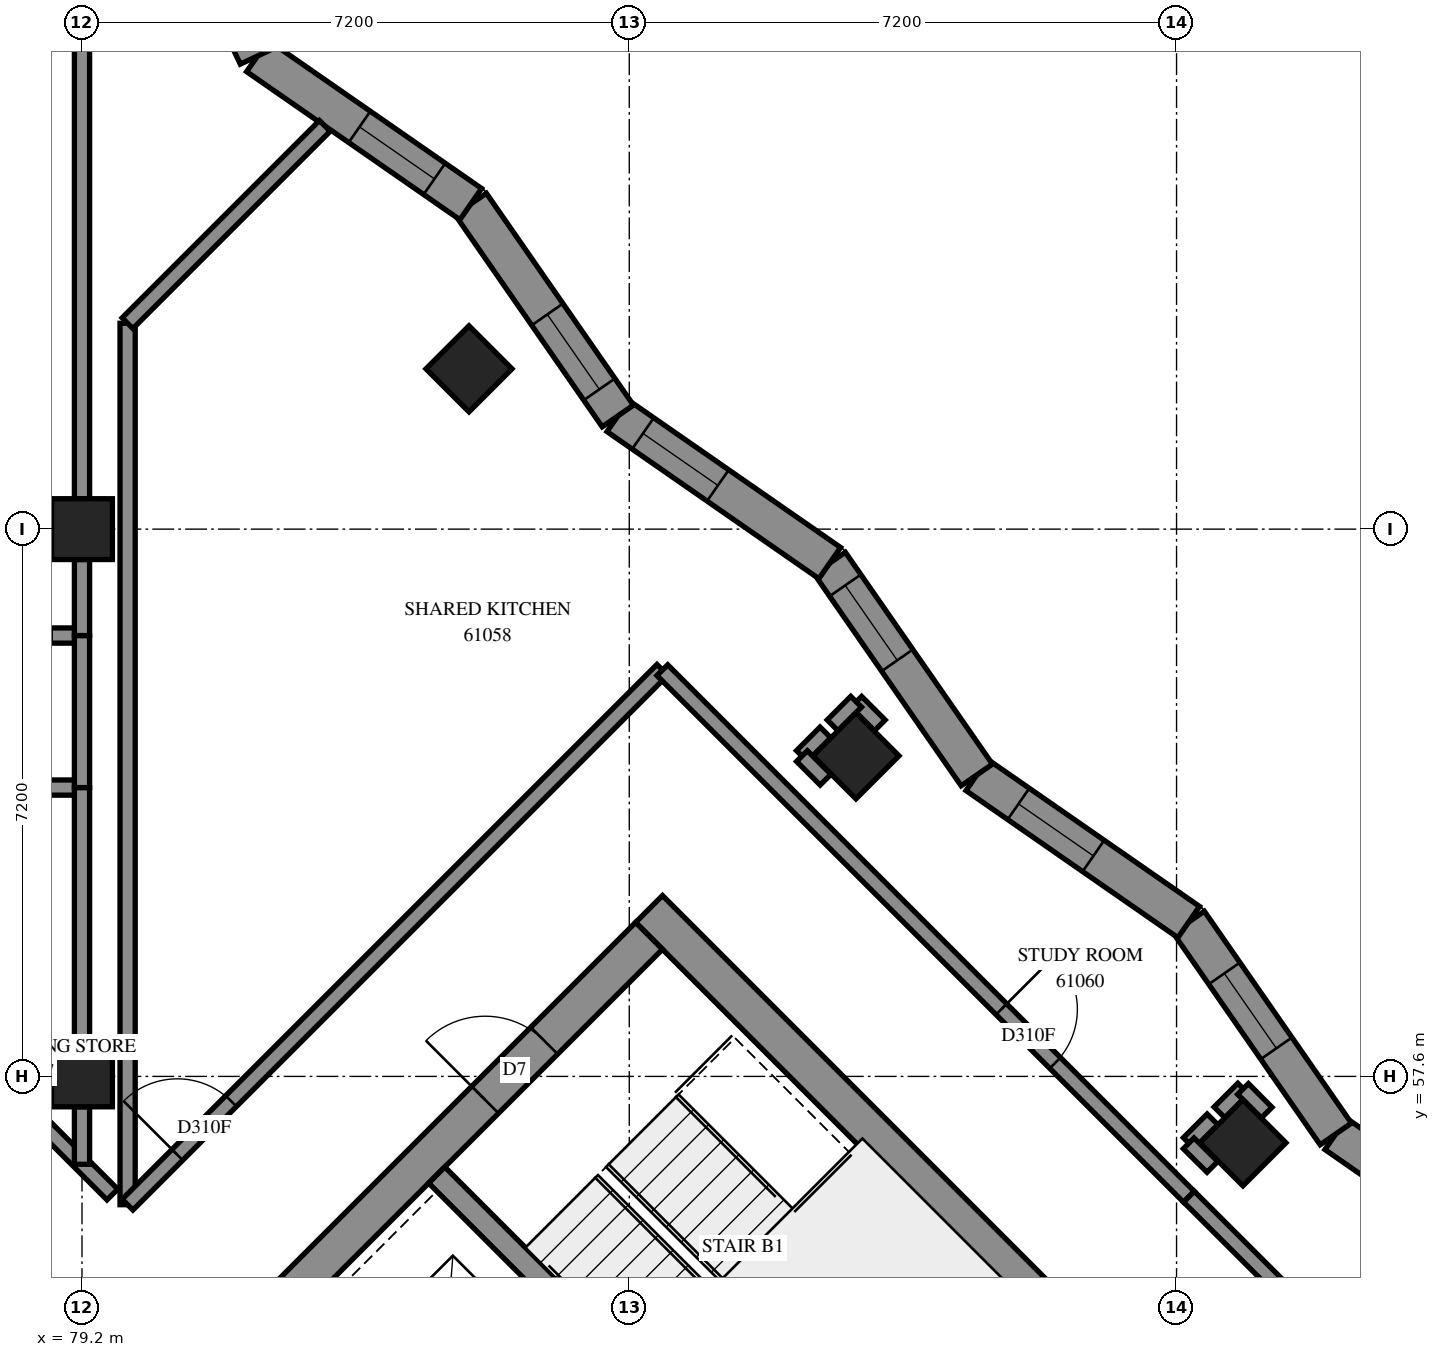
"""IFC4 building model, lengths in metres.
Left out: names, types, materials, properties, quantities, classifications, styles, units other than length and angle.
Written with IfcOpenShell. Run it as: python <this file> out.ifc"""

import sys

from ifc_helpers import new_model, si_unit, direction, frame, frame_2d, origin, origin_2d, place, context, subcontext, project, spatial, polyline, rectangle, outline, extrude, element, fill, save


model = new_model("IFC4")
c1 = context("Model", 3, precision=1e-05, world=origin(), true_north=direction((0.0, 1.0)))
c2 = subcontext(c1, "Body", "Model", "MODEL_VIEW")
j1 = project(units=[si_unit("LENGTHUNIT", "METRE"), si_unit("PLANEANGLEUNIT", "RADIAN")], contexts=[c1])
p1 = place(None, origin())
s1 = spatial("IfcSite", under=j1, at=p1, CompositionType="ELEMENT")
p2 = place(p1, origin())
s2 = spatial("IfcBuilding", under=s1, at=p2, CompositionType="ELEMENT")
p3 = place(p2, frame((0.0, 0.0, 223.6)))
s3 = spatial("IfcBuildingStorey", under=s2, at=p3, CompositionType="ELEMENT", Elevation=223.6)
for number, where, z_axis, x_axis in (
    (1, (79.2, 57.6, 0.0), (0.0, 0.0, 1.0), (1.0, 0.0, 0.0)),
    (2, (79.2, 64.8, 0.0), (0.0, 0.0, 1.0), (1.0, 0.0, 0.0)),
    (3, (84.291, 66.909, 0.0), (0.0, 0.0, 1.0), (0.707, -0.707, 0.0)),
    (4, (89.382, 61.818, 0.0), (0.0, 0.0, 1.0), (0.707, -0.707, 0.0)),
    (5, (94.474, 56.727, 0.0), (0.0, 0.0, 1.0), (0.707, -0.707, 0.0)),
):
    element("IfcColumn", number, at=place(p3, frame(where, z_axis=z_axis, x_axis=x_axis)), inside=s3, PredefinedType="COLUMN", context=c2, shape_type="SweptSolid", body=[
        extrude(rectangle(XDim=0.8, YDim=0.8, at=origin_2d()), origin(), (0.0, 0.0, 1.0), 3.1),
    ])
p4 = place(p3, frame((86.66, 59.802, -0.3), z_axis=(0.0, 0.0, 1.0), x_axis=(0.7071067812, -0.7071067812, 0.0)))
e6 = element("IfcWall", 6, at=p4, inside=s3, PredefinedType="SHEAR", context=c2, shape_type="SweptSolid", body=[
    extrude(rectangle(XDim=15.4, YDim=0.5, at=frame_2d((7.7, 0.0))), origin(), (0.0, 0.0, 1.0), 2.7),
])
p5 = place(p4, frame((10.5, 0.0, 0.3)))
e7 = element("IfcOpeningElement", 7, at=p5, cuts=e6, PredefinedType="OPENING", context=c2, shape_type="SweptSolid", body=[
    extrude(rectangle(XDim=0.8, YDim=2.1, at=frame_2d((0.4, 1.05))), frame((0.0, 0.26, 0.0), z_axis=(0.0, -1.0, 0.0), x_axis=(1.0, 0.0, 0.0)), (0.0, 0.0, 1.0), 0.52),
])
p6 = place(p3, frame((76.478, 49.267, -0.3), z_axis=(0.0, 0.0, 1.0), x_axis=(0.7071067812, 0.7071067812, 0.0)))
e8 = element("IfcWall", 8, at=p6, inside=s3, PredefinedType="SHEAR", context=c2, shape_type="SweptSolid", body=[
    extrude(rectangle(XDim=14.4, YDim=0.5, at=frame_2d((7.2, 0.0))), origin(), (0.0, 0.0, 1.0), 2.7),
])
p7 = place(p6, frame((4.55, 0.0, 0.3)))
e9 = element("IfcOpeningElement", 9, at=p7, cuts=e8, PredefinedType="OPENING", context=c2, shape_type="SweptSolid", body=[
    extrude(rectangle(XDim=1.1, YDim=2.1, at=frame_2d((0.55, 1.05))), frame((0.0, 0.26, 0.0), z_axis=(0.0, -1.0, 0.0), x_axis=(1.0, 0.0, 0.0)), (0.0, 0.0, 1.0), 0.52),
])
p8 = place(p6, frame((11.35, 0.0, 0.3)))
e10 = element("IfcOpeningElement", 10, at=p8, cuts=e8, PredefinedType="OPENING", context=c2, shape_type="SweptSolid", body=[
    extrude(rectangle(XDim=1.1, YDim=2.1, at=frame_2d((0.55, 1.05))), frame((0.0, 0.26, 0.0), z_axis=(0.0, -1.0, 0.0), x_axis=(1.0, 0.0, 0.0)), (0.0, 0.0, 1.0), 0.52),
])
p9 = place(p3, frame((83.867, 56.302, 0.0), z_axis=(0.0, 0.0, 1.0), x_axis=(0.7071137256, -0.7070998367, 0.0)))
e11 = element("IfcWall", 11, at=p9, inside=s3, PredefinedType="SOLIDWALL", context=c2, shape_type="SweptSolid", body=[
    extrude(rectangle(XDim=7.2, YDim=0.3, at=frame_2d((3.6, 0.0))), origin(), (0.0, 0.0, 1.0), 3.1),
])
p10 = place(p3, frame((98.483, 54.908, 0.0), z_axis=(0.0, 0.0, 1.0), x_axis=(-0.8215041665, 0.5702025117, 0.0)))
e12 = element("IfcWall", 12, at=p10, inside=s3, PredefinedType="SOLIDWALL", context=c2, shape_type="SweptSolid", body=[
    extrude(outline(polyline([(-0.045, -0.25), (3.348, -0.25), (3.439, 0.25), (0.045, 0.25), (-0.045, -0.25)])), origin(), (0.0, 0.0, 1.0), 3.1),
])
p11 = place(p10, frame((1.261, 0.0, 0.45)))
e13 = element("IfcOpeningElement", 13, at=p11, cuts=e12, PredefinedType="OPENING", context=c2, shape_type="SweptSolid", body=[
    extrude(rectangle(XDim=1.2, YDim=2.5, at=frame_2d((0.6, 1.25))), frame((0.0, 0.26, 0.0), z_axis=(0.0, -1.0, 0.0), x_axis=(1.0, 0.0, 0.0)), (0.0, 0.0, 1.0), 0.52),
])
p12 = place(p3, frame((95.695, 56.843, 0.0), z_axis=(0.0, 0.0, 1.0), x_axis=(-0.5702025117, 0.8215041665, 0.0)))
e14 = element("IfcWall", 14, at=p12, inside=s3, PredefinedType="SOLIDWALL", context=c2, shape_type="SweptSolid", body=[
    extrude(outline(polyline([(0.045, -0.25), (3.439, -0.25), (3.348, 0.25), (-0.045, 0.25), (0.045, -0.25)])), origin(), (0.0, 0.0, 1.0), 3.1),
])
p13 = place(p12, frame((1.371, 0.0, 0.45)))
e15 = element("IfcOpeningElement", 15, at=p13, cuts=e14, PredefinedType="OPENING", context=c2, shape_type="SweptSolid", body=[
    extrude(rectangle(XDim=1.2, YDim=2.5, at=frame_2d((0.6, 1.25))), frame((0.0, 0.26, 0.0), z_axis=(0.0, -1.0, 0.0), x_axis=(1.0, 0.0, 0.0)), (0.0, 0.0, 1.0), 0.52),
])
p14 = place(p3, frame((93.76, 59.631, 0.0), z_axis=(0.0, 0.0, 1.0), x_axis=(-0.8215041665, 0.5702025117, 0.0)))
e16 = element("IfcWall", 16, at=p14, inside=s3, PredefinedType="SOLIDWALL", context=c2, shape_type="SweptSolid", body=[
    extrude(outline(polyline([(-0.045, -0.25), (3.348, -0.25), (3.439, 0.25), (0.045, 0.25), (-0.045, -0.25)])), origin(), (0.0, 0.0, 1.0), 3.1),
])
p15 = place(p14, frame((1.526, 0.0, 0.45)))
e17 = element("IfcOpeningElement", 17, at=p15, cuts=e16, PredefinedType="OPENING", context=c2, shape_type="SweptSolid", body=[
    extrude(rectangle(XDim=1.2, YDim=2.5, at=frame_2d((0.6, 1.25))), frame((0.0, 0.26, 0.0), z_axis=(0.0, -1.0, 0.0), x_axis=(1.0, 0.0, 0.0)), (0.0, 0.0, 1.0), 0.52),
])
p16 = place(p3, frame((90.972, 61.566, 0.0), z_axis=(0.0, 0.0, 1.0), x_axis=(-0.5702025117, 0.8215041665, 0.0)))
e18 = element("IfcWall", 18, at=p16, inside=s3, PredefinedType="SOLIDWALL", context=c2, shape_type="SweptSolid", body=[
    extrude(outline(polyline([(0.045, -0.25), (3.439, -0.25), (3.348, 0.25), (-0.045, 0.25), (0.045, -0.25)])), origin(), (0.0, 0.0, 1.0), 3.1),
])
p17 = place(p16, frame((1.836, 0.0, 0.45)))
e19 = element("IfcOpeningElement", 19, at=p17, cuts=e18, PredefinedType="OPENING", context=c2, shape_type="SweptSolid", body=[
    extrude(rectangle(XDim=1.2, YDim=2.5, at=frame_2d((0.6, 1.25))), frame((0.0, 0.26, 0.0), z_axis=(0.0, -1.0, 0.0), x_axis=(1.0, 0.0, 0.0)), (0.0, 0.0, 1.0), 0.52),
])
p18 = place(p3, frame((89.037, 64.353, 0.0), z_axis=(0.0, 0.0, 1.0), x_axis=(-0.8215041665, 0.5702025117, 0.0)))
e20 = element("IfcWall", 20, at=p18, inside=s3, PredefinedType="SOLIDWALL", context=c2, shape_type="SweptSolid", body=[
    extrude(outline(polyline([(-0.045, -0.25), (3.348, -0.25), (3.439, 0.25), (0.045, 0.25), (-0.045, -0.25)])), origin(), (0.0, 0.0, 1.0), 3.1),
])
p19 = place(p18, frame((1.791, 0.0, 0.45)))
e21 = element("IfcOpeningElement", 21, at=p19, cuts=e20, PredefinedType="OPENING", context=c2, shape_type="SweptSolid", body=[
    extrude(rectangle(XDim=1.2, YDim=2.5, at=frame_2d((0.6, 1.25))), frame((0.0, 0.26, 0.0), z_axis=(0.0, -1.0, 0.0), x_axis=(1.0, 0.0, 0.0)), (0.0, 0.0, 1.0), 0.52),
])
p20 = place(p3, frame((86.249, 66.288, 0.0), z_axis=(0.0, 0.0, 1.0), x_axis=(-0.5702025117, 0.8215041665, 0.0)))
e22 = element("IfcWall", 22, at=p20, inside=s3, PredefinedType="SOLIDWALL", context=c2, shape_type="SweptSolid", body=[
    extrude(outline(polyline([(0.045, -0.25), (3.439, -0.25), (3.348, 0.25), (-0.045, 0.25), (0.045, -0.25)])), origin(), (0.0, 0.0, 1.0), 3.1),
])
p21 = place(p20, frame((0.426, 0.0, 0.45)))
e23 = element("IfcOpeningElement", 23, at=p21, cuts=e22, PredefinedType="OPENING", context=c2, shape_type="SweptSolid", body=[
    extrude(rectangle(XDim=1.2, YDim=2.5, at=frame_2d((0.6, 1.25))), frame((0.0, 0.26, 0.0), z_axis=(0.0, -1.0, 0.0), x_axis=(1.0, 0.0, 0.0)), (0.0, 0.0, 1.0), 0.52),
])
p22 = place(p3, frame((84.314, 69.076, 0.0), z_axis=(0.0, 0.0, 1.0), x_axis=(-0.8215033056, 0.5702037521, 0.0)))
e24 = element("IfcWall", 24, at=p22, inside=s3, PredefinedType="SOLIDWALL", context=c2, shape_type="SweptSolid", body=[
    extrude(outline(polyline([(-0.045, -0.25), (3.348, -0.25), (3.483, 0.25), (0.045, 0.25), (-0.045, -0.25)])), origin(), (0.0, 0.0, 1.0), 3.1),
])
p23 = place(p22, frame((0.581, 0.0, 0.45)))
e25 = element("IfcOpeningElement", 25, at=p23, cuts=e24, PredefinedType="OPENING", context=c2, shape_type="SweptSolid", body=[
    extrude(rectangle(XDim=1.2, YDim=2.5, at=frame_2d((0.6, 1.25))), frame((0.0, 0.26, 0.0), z_axis=(0.0, -1.0, 0.0), x_axis=(1.0, 0.0, 0.0)), (0.0, 0.0, 1.0), 0.52),
])
p24 = place(p3, frame((81.508, 71.024, 0.0), z_axis=(0.0, 0.0, 1.0), x_axis=(-0.4256057347, 0.9049087018, 0.0)))
e26 = element("IfcWall", 26, at=p24, inside=s3, PredefinedType="SOLIDWALL", context=c2, shape_type="SweptSolid", body=[
    extrude(outline(polyline([(0.067, -0.25), (3.617, -0.25), (3.181, 0.25), (-0.067, 0.25), (0.067, -0.25)])), origin(), (0.0, 0.0, 1.0), 3.1),
])
p25 = place(p24, frame((0.734, 0.0, 0.45)))
e27 = element("IfcOpeningElement", 27, at=p25, cuts=e26, PredefinedType="OPENING", context=c2, shape_type="SweptSolid", body=[
    extrude(rectangle(XDim=1.2, YDim=2.5, at=frame_2d((0.6, 1.25))), frame((0.0, 0.26, 0.0), z_axis=(0.0, -1.0, 0.0), x_axis=(1.0, 0.0, 0.0)), (0.0, 0.0, 1.0), 0.52),
])
p26 = place(p3, frame((79.8, 55.912, 0.0), z_axis=(0.0, 0.0, 1.0), x_axis=(0.0, 1.0, 0.0)))
e28 = element("IfcWall", 28, at=p26, inside=s3, PredefinedType="PARTITIONING", context=c2, shape_type="SweptSolid", body=[
    extrude(rectangle(XDim=11.596, YDim=0.2, at=frame_2d((5.798, 0.0))), origin(), (0.0, 0.0, 1.0), 3.1),
])
p27 = place(p3, frame((79.799, 55.913, 0.0), z_axis=(0.0, 0.0, 1.0), x_axis=(0.7071067812, 0.7071067812, 0.0)))
e29 = element("IfcWall", 29, at=p27, inside=s3, PredefinedType="PARTITIONING", context=c2, shape_type="SweptSolid", body=[
    extrude(rectangle(XDim=9.95, YDim=0.2, at=frame_2d((4.975, 0.0))), origin(), (0.0, 0.0, 1.0), 3.1),
])
p28 = place(p27, frame((0.927, 0.0, 0.0)))
e30 = element("IfcOpeningElement", 30, at=p28, cuts=e29, PredefinedType="OPENING", context=c2, shape_type="SweptSolid", body=[
    extrude(rectangle(XDim=1.0, YDim=2.1, at=frame_2d((0.5, 1.05))), frame((0.0, 0.11, 0.0), z_axis=(0.0, -1.0, 0.0), x_axis=(1.0, 0.0, 0.0)), (0.0, 0.0, 1.0), 0.22),
])
p29 = place(p3, frame((86.835, 62.945, 0.0), z_axis=(0.0, 0.0, 1.0), x_axis=(0.7071067812, -0.7071067812, 0.0)))
e31 = element("IfcWall", 31, at=p29, inside=s3, PredefinedType="PARTITIONING", context=c2, shape_type="SweptSolid", body=[
    extrude(rectangle(XDim=9.798, YDim=0.2, at=frame_2d((4.899, 0.0))), origin(), (0.0, 0.0, 1.0), 3.1),
])
p30 = place(p29, frame((6.308, 0.0, 0.0)))
e32 = element("IfcOpeningElement", 32, at=p30, cuts=e31, PredefinedType="OPENING", context=c2, shape_type="SweptSolid", body=[
    extrude(rectangle(XDim=1.0, YDim=2.1, at=frame_2d((0.5, 1.05))), frame((0.0, 0.11, 0.0), z_axis=(0.0, -1.0, 0.0), x_axis=(1.0, 0.0, 0.0)), (0.0, 0.0, 1.0), 0.22),
])
p31 = place(p3, frame((79.2, 65.2, 0.0), z_axis=(0.0, 0.0, 1.0), x_axis=(0.0, 1.0, 0.0)))
e33 = element("IfcWall", 33, at=p31, inside=s3, PredefinedType="PARTITIONING", context=c2, shape_type="SweptSolid", body=[
    extrude(rectangle(XDim=6.4, YDim=0.2, at=frame_2d((3.2, 0.0))), origin(), (0.0, 0.0, 1.0), 3.1),
])
p32 = place(p3, frame((74.246, 61.4, 0.0), z_axis=(0.0, 0.0, 1.0), x_axis=(1.0, 0.0, 0.0)))
e34 = element("IfcWall", 34, at=p32, inside=s3, PredefinedType="PARTITIONING", context=c2, shape_type="SweptSolid", body=[
    extrude(rectangle(XDim=4.954, YDim=0.2, at=frame_2d((2.477, 0.0))), origin(), (0.0, 0.0, 1.0), 3.1),
])
p33 = place(p32, frame((1.17, 0.0, 0.0)))
e35 = element("IfcOpeningElement", 35, at=p33, cuts=e34, PredefinedType="OPENING", context=c2, shape_type="SweptSolid", body=[
    extrude(rectangle(XDim=1.0, YDim=2.1, at=frame_2d((0.5, 1.05))), frame((0.0, 0.11, 0.0), z_axis=(0.0, -1.0, 0.0), x_axis=(1.0, 0.0, 0.0)), (0.0, 0.0, 1.0), 0.22),
])
p34 = place(p3, frame((74.602, 63.4, 0.0), z_axis=(0.0, 0.0, 1.0), x_axis=(1.0, 0.0, 0.0)))
e36 = element("IfcWall", 36, at=p34, inside=s3, PredefinedType="PARTITIONING", context=c2, shape_type="SweptSolid", body=[
    extrude(rectangle(XDim=4.598, YDim=0.2, at=frame_2d((2.299, 0.0))), origin(), (0.0, 0.0, 1.0), 3.1),
])
p35 = place(p34, frame((3.298, 0.0, 0.0)))
e37 = element("IfcOpeningElement", 37, at=p35, cuts=e36, PredefinedType="OPENING", context=c2, shape_type="SweptSolid", body=[
    extrude(rectangle(XDim=0.9, YDim=2.1, at=frame_2d((0.45, 1.05))), frame((0.0, 0.11, 0.0), z_axis=(0.0, -1.0, 0.0), x_axis=(1.0, 0.0, 0.0)), (0.0, 0.0, 1.0), 0.22),
])
p36 = place(p3, frame((76.513, 59.131, 0.0), z_axis=(0.0, 0.0, 1.0), x_axis=(0.7073587997, -0.7068546728, 0.0)))
e38 = element("IfcWall", 38, at=p36, inside=s3, PredefinedType="PARTITIONING", context=c2, shape_type="SweptSolid", body=[
    extrude(rectangle(XDim=4.364, YDim=0.2, at=frame_2d((2.182, 0.0))), origin(), (0.0, 0.0, 1.0), 3.1),
])
p37 = place(p3, frame((79.799, 67.509, 0.0), z_axis=(0.0, 0.0, 1.0), x_axis=(0.707093159, 0.7071204031, 0.0)))
e39 = element("IfcWall", 39, at=p37, inside=s3, PredefinedType="PARTITIONING", context=c2, shape_type="SweptSolid", body=[
    extrude(rectangle(XDim=3.671, YDim=0.2, at=frame_2d((1.835, 0.0))), origin(), (0.0, 0.0, 1.0), 3.1),
])
p38 = place(p3, frame((79.2, 58.0, 0.0), z_axis=(0.0, 0.0, 1.0), x_axis=(0.0, 1.0, 0.0)))
e40 = element("IfcWall", 40, at=p38, inside=s3, PredefinedType="PARTITIONING", context=c2, shape_type="SweptSolid", body=[
    extrude(rectangle(XDim=3.4, YDim=0.2, at=frame_2d((1.7, 0.0))), origin(), (0.0, 0.0, 1.0), 3.1),
])
p39 = place(p3, frame((79.2, 61.4, 0.0), z_axis=(0.0, 0.0, 1.0), x_axis=(0.0, 1.0, 0.0)))
e41 = element("IfcWall", 41, at=p39, inside=s3, PredefinedType="PARTITIONING", context=c2, shape_type="SweptSolid", body=[
    extrude(rectangle(XDim=2.0, YDim=0.2, at=frame_2d((1.0, 0.0))), origin(), (0.0, 0.0, 1.0), 3.1),
])
p40 = place(p3, frame((93.763, 56.017, 0.0), z_axis=(0.0, 0.0, 1.0), x_axis=(0.7076620277, -0.7065510983, 0.0)))
e42 = element("IfcWall", 42, at=p40, inside=s3, PredefinedType="PARTITIONING", context=c2, shape_type="SweptSolid", body=[
    extrude(rectangle(XDim=1.8, YDim=0.2, at=frame_2d((0.9, 0.0))), origin(), (0.0, 0.0, 1.0), 3.1),
])
p41 = place(p3, frame((79.2, 63.4, 0.0), z_axis=(0.0, 0.0, 1.0), x_axis=(0.0, 1.0, 0.0)))
e43 = element("IfcWall", 43, at=p41, inside=s3, PredefinedType="PARTITIONING", context=c2, shape_type="SweptSolid", body=[
    extrude(rectangle(XDim=1.0, YDim=0.2, at=frame_2d((0.5, 0.0))), origin(), (0.0, 0.0, 1.0), 3.1),
])
p42 = place(p3, frame((79.2, 56.444, 0.0), z_axis=(0.0, 0.0, 1.0), x_axis=(0.0, 1.0, 0.0)))
e44 = element("IfcWall", 44, at=p42, inside=s3, PredefinedType="PARTITIONING", context=c2, shape_type="SweptSolid", body=[
    extrude(rectangle(XDim=0.756, YDim=0.2, at=frame_2d((0.378, 0.0))), origin(), (0.0, 0.0, 1.0), 3.1),
])
for number, where, z_axis, x_axis in (
    (45, (93.761, 56.723, 0.0), (0.0, 0.0, 1.0), (0.707, 0.707, 0.0)),
    (46, (94.165, 57.127, 0.0), (0.0, 0.0, 1.0), (0.707, 0.707, 0.0)),
):
    element("IfcWall", number, at=place(p3, frame(where, z_axis=z_axis, x_axis=x_axis)), inside=s3, PredefinedType="PARTITIONING", context=c2, shape_type="SweptSolid", body=[
        extrude(rectangle(XDim=0.441, YDim=0.2, at=frame_2d((0.221, 0.0))), origin(), (0.0, 0.0, 1.0), 3.1),
    ])
for number, where, z_axis, x_axis in (
    (47, (94.475, 57.435, 0.0), (0.0, 0.0, 1.0), (0.705, -0.709, 0.0)),
    (48, (93.76, 56.719, 0.0), (0.0, 0.0, 1.0), (0.709, -0.705, 0.0)),
):
    element("IfcWall", number, at=place(p3, frame(where, z_axis=z_axis, x_axis=x_axis)), inside=s3, PredefinedType="PARTITIONING", context=c2, shape_type="SweptSolid", body=[
        extrude(rectangle(XDim=0.44, YDim=0.2, at=frame_2d((0.22, 0.0))), origin(), (0.0, 0.0, 1.0), 3.1),
    ])
for number, where, z_axis, x_axis in (
    (49, (88.671, 61.815, 0.0), (0.0, 0.0, 1.0), (0.707, 0.707, 0.0)),
    (50, (88.672, 61.814, 0.0), (0.0, 0.0, 1.0), (0.707, -0.707, 0.0)),
    (51, (89.386, 62.528, 0.0), (0.0, 0.0, 1.0), (0.707, -0.707, 0.0)),
    (52, (89.075, 62.219, 0.0), (0.0, 0.0, 1.0), (0.707, 0.707, 0.0)),
):
    element("IfcWall", number, at=place(p3, frame(where, z_axis=z_axis, x_axis=x_axis)), inside=s3, PredefinedType="PARTITIONING", context=c2, shape_type="SweptSolid", body=[
        extrude(rectangle(XDim=0.438, YDim=0.2, at=frame_2d((0.219, 0.0))), origin(), (0.0, 0.0, 1.0), 3.1),
    ])
p43 = place(p13, origin())
e53 = element("IfcWindow", 53, at=p43, inside=s3, PartitioningType="SINGLE_PANEL", PredefinedType="WINDOW", context=c2, shape_type="SweptSolid", body=[
    extrude(rectangle(XDim=1.2, YDim=2.5, at=frame_2d((0.6, 1.25))), frame((0.0, 0.18, 0.0), z_axis=(0.0, -1.0, 0.0), x_axis=(1.0, 0.0, 0.0)), (0.0, 0.0, 1.0), 0.06),
])
fill(e15, e53)
p44 = place(p15, origin())
e54 = element("IfcWindow", 54, at=p44, inside=s3, PartitioningType="SINGLE_PANEL", PredefinedType="WINDOW", context=c2, shape_type="SweptSolid", body=[
    extrude(rectangle(XDim=1.2, YDim=2.5, at=frame_2d((0.6, 1.25))), frame((0.0, 0.18, 0.0), z_axis=(0.0, -1.0, 0.0), x_axis=(1.0, 0.0, 0.0)), (0.0, 0.0, 1.0), 0.06),
])
fill(e17, e54)
p45 = place(p17, origin())
e55 = element("IfcWindow", 55, at=p45, inside=s3, PartitioningType="SINGLE_PANEL", PredefinedType="WINDOW", context=c2, shape_type="SweptSolid", body=[
    extrude(rectangle(XDim=1.2, YDim=2.5, at=frame_2d((0.6, 1.25))), frame((0.0, 0.18, 0.0), z_axis=(0.0, -1.0, 0.0), x_axis=(1.0, 0.0, 0.0)), (0.0, 0.0, 1.0), 0.06),
])
fill(e19, e55)
p46 = place(p19, origin())
e56 = element("IfcWindow", 56, at=p46, inside=s3, PartitioningType="SINGLE_PANEL", PredefinedType="WINDOW", context=c2, shape_type="SweptSolid", body=[
    extrude(rectangle(XDim=1.2, YDim=2.5, at=frame_2d((0.6, 1.25))), frame((0.0, 0.18, 0.0), z_axis=(0.0, -1.0, 0.0), x_axis=(1.0, 0.0, 0.0)), (0.0, 0.0, 1.0), 0.06),
])
fill(e21, e56)
p47 = place(p21, origin())
e57 = element("IfcWindow", 57, at=p47, inside=s3, PartitioningType="SINGLE_PANEL", PredefinedType="WINDOW", context=c2, shape_type="SweptSolid", body=[
    extrude(rectangle(XDim=1.2, YDim=2.5, at=frame_2d((0.6, 1.25))), frame((0.0, 0.18, 0.0), z_axis=(0.0, -1.0, 0.0), x_axis=(1.0, 0.0, 0.0)), (0.0, 0.0, 1.0), 0.06),
])
fill(e23, e57)
p48 = place(p23, origin())
e58 = element("IfcWindow", 58, at=p48, inside=s3, PartitioningType="SINGLE_PANEL", PredefinedType="WINDOW", context=c2, shape_type="SweptSolid", body=[
    extrude(rectangle(XDim=1.2, YDim=2.5, at=frame_2d((0.6, 1.25))), frame((0.0, 0.18, 0.0), z_axis=(0.0, -1.0, 0.0), x_axis=(1.0, 0.0, 0.0)), (0.0, 0.0, 1.0), 0.06),
])
fill(e25, e58)
p49 = place(p8, origin())
e59 = element("IfcDoor", 59, at=p49, inside=s3, OperationType="SINGLE_SWING_LEFT", PredefinedType="DOOR", context=c2, shape_type="SweptSolid", body=[
    extrude(rectangle(XDim=1.1, YDim=2.1, at=frame_2d((0.55, 1.05))), frame((0.0, 0.025, 0.0), z_axis=(0.0, -1.0, 0.0), x_axis=(1.0, 0.0, 0.0)), (0.0, 0.0, 1.0), 0.05),
])
fill(e10, e59)
p50 = place(p28, origin())
e60 = element("IfcDoor", 60, at=p50, inside=s3, OperationType="SINGLE_SWING_RIGHT", PredefinedType="DOOR", context=c2, shape_type="SweptSolid", body=[
    extrude(rectangle(XDim=1.0, YDim=2.1, at=frame_2d((0.5, 1.05))), frame((0.0, 0.025, 0.0), z_axis=(0.0, -1.0, 0.0), x_axis=(1.0, 0.0, 0.0)), (0.0, 0.0, 1.0), 0.05),
])
fill(e30, e60)
p51 = place(p30, origin())
e61 = element("IfcDoor", 61, at=p51, inside=s3, OperationType="SINGLE_SWING_LEFT", PredefinedType="DOOR", context=c2, shape_type="SweptSolid", body=[
    extrude(rectangle(XDim=1.0, YDim=2.1, at=frame_2d((0.5, 1.05))), frame((0.0, 0.025, 0.0), z_axis=(0.0, -1.0, 0.0), x_axis=(1.0, 0.0, 0.0)), (0.0, 0.0, 1.0), 0.05),
])
fill(e32, e61)
save(model, sys.argv[1])
